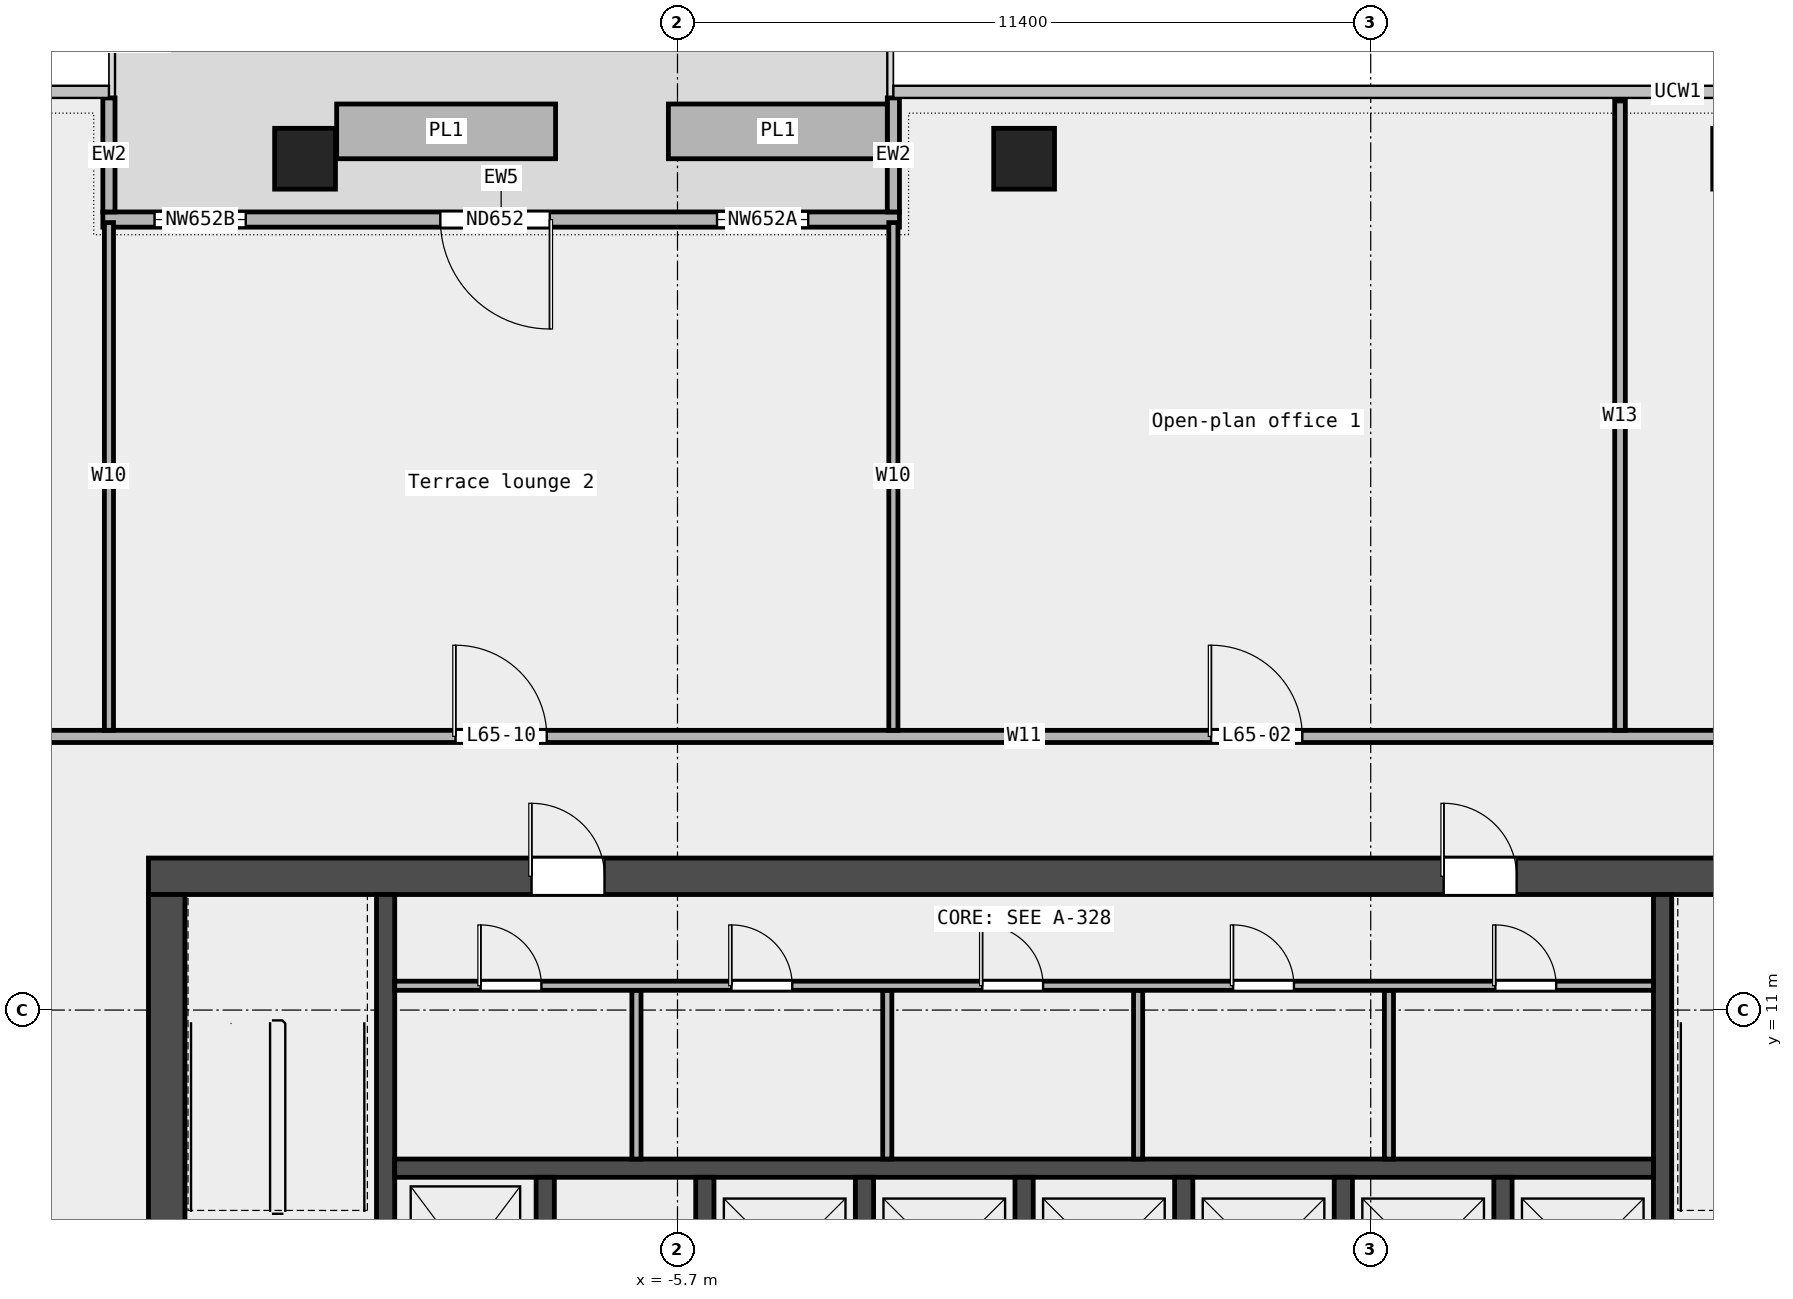
"""IFC4 building model, lengths in metres.
Left out: names, types, materials, properties, quantities, classifications, styles, units other than length and angle.
Written with IfcOpenShell. Run it as: python <this file> out.ifc"""

import sys

from ifc_helpers import new_model, si_unit, direction, frame, frame_2d, origin, origin_2d, place, context, subcontext, project, spatial, rectangle, extrude, element, fill, save


model = new_model("IFC4")
c1 = context("Model", 3, precision=1e-05, world=origin(), true_north=direction((0.0, 1.0)))
c2 = subcontext(c1, "Body", "Model", "MODEL_VIEW")
j1 = project(units=[si_unit("LENGTHUNIT", "METRE"), si_unit("PLANEANGLEUNIT", "RADIAN")], contexts=[c1])
p1 = place(None, origin())
s1 = spatial("IfcSite", under=j1, at=p1, CompositionType="ELEMENT")
p2 = place(p1, origin())
s2 = spatial("IfcBuilding", under=s1, at=p2, CompositionType="ELEMENT")
p3 = place(p2, frame((0.0, 0.0, 299.4)))
s3 = spatial("IfcBuildingStorey", under=s2, at=p3, CompositionType="ELEMENT", Elevation=299.4)
for number, where, z_axis, x_axis in (
    (1, (11.825, 25.0, 0.0), (0.0, 0.0, 1.0), (1.0, 0.0, 0.0)),
    (2, (0.0, 25.0, 0.0), (0.0, 0.0, 1.0), (1.0, 0.0, 0.0)),
    (3, (-11.825, 25.0, 0.0), (0.0, 0.0, 1.0), (1.0, 0.0, 0.0)),
):
    element("IfcColumn", number, at=place(p3, frame(where, z_axis=z_axis, x_axis=x_axis)), inside=s3, PredefinedType="COLUMN", context=c2, shape_type="SweptSolid", body=[
        extrude(rectangle(XDim=1.0, YDim=1.0, at=origin_2d()), origin(), (0.0, 0.0, 1.0), 3.6),
    ])
p4 = place(p3, frame((-2.05, 24.0, 0.0), z_axis=(0.0, 0.0, 1.0), x_axis=(-1.0, 0.0, 0.0)))
e4 = element("IfcWall", 4, at=p4, inside=s3, PredefinedType="STANDARD", context=c2, shape_type="SweptSolid", body=[
    extrude(rectangle(XDim=13.1, YDim=0.25, at=frame_2d((6.55, 0.0))), origin(), (0.0, 0.0, 1.0), 3.6),
])
p5 = place(p4, frame((1.5, 0.0, 0.45)))
e5 = element("IfcOpeningElement", 5, at=p5, cuts=e4, PredefinedType="OPENING", context=c2, shape_type="SweptSolid", body=[
    extrude(rectangle(XDim=1.5, YDim=2.4, at=frame_2d((0.75, 1.2))), frame((0.0, 0.137, 0.0), z_axis=(0.0, -1.0, 0.0), x_axis=(1.0, 0.0, 0.0)), (0.0, 0.0, 1.0), 0.274),
])
p6 = place(p4, frame((5.75, 0.0, 0.0)))
e6 = element("IfcOpeningElement", 6, at=p6, cuts=e4, PredefinedType="OPENING", context=c2, shape_type="SweptSolid", body=[
    extrude(rectangle(XDim=1.8, YDim=2.4, at=frame_2d((0.9, 1.2))), frame((0.0, 0.137, 0.0), z_axis=(0.0, -1.0, 0.0), x_axis=(1.0, 0.0, 0.0)), (0.0, 0.0, 1.0), 0.274),
])
p7 = place(p4, frame((10.75, 0.0, 0.45)))
e7 = element("IfcOpeningElement", 7, at=p7, cuts=e4, PredefinedType="OPENING", context=c2, shape_type="SweptSolid", body=[
    extrude(rectangle(XDim=1.5, YDim=2.4, at=frame_2d((0.75, 1.2))), frame((0.0, 0.137, 0.0), z_axis=(0.0, -1.0, 0.0), x_axis=(1.0, 0.0, 0.0)), (0.0, 0.0, 1.0), 0.274),
])
for number, where, z_axis, x_axis in (
    (8, (-2.15, 26.0, 0.0), (0.0, 0.0, 1.0), (0.0, -1.0, 0.0)),
    (9, (-15.05, 26.0, 0.0), (0.0, 0.0, 1.0), (0.0, -1.0, 0.0)),
):
    element("IfcWall", number, at=place(p3, frame(where, z_axis=z_axis, x_axis=x_axis)), inside=s3, PredefinedType="STANDARD", context=c2, shape_type="SweptSolid", body=[
        extrude(rectangle(XDim=1.875, YDim=0.2, at=frame_2d((0.938, 0.0))), origin(), (0.0, 0.0, 1.0), 3.6),
    ])
for number, where, z_axis, x_axis in (
    (10, (-2.25, 25.45, 0.0), (0.0, 0.0, 1.0), (-1.0, 0.0, 0.0)),
    (11, (-7.705, 25.45, 0.0), (0.0, 0.0, 1.0), (-1.0, 0.0, 0.0)),
):
    element("IfcWall", number, at=place(p3, frame(where, z_axis=z_axis, x_axis=x_axis)), inside=s3, PredefinedType="STANDARD", context=c2, shape_type="SweptSolid", body=[
        extrude(rectangle(XDim=3.6, YDim=0.9, at=frame_2d((1.8, 0.0))), origin(), (0.0, 0.0, 1.0), 0.7),
    ])
p8 = place(p3, frame((-29.6, 15.5, 0.0), z_axis=(0.0, 0.0, 1.0), x_axis=(1.0, 0.0, 0.0)))
e12 = element("IfcWall", 12, at=p8, inside=s3, PredefinedType="PARTITIONING", context=c2, shape_type="SweptSolid", body=[
    extrude(rectangle(XDim=59.2, YDim=0.2, at=frame_2d((29.6, 0.0))), origin(), (0.0, 0.0, 1.0), 3.6),
])
p9 = place(p8, frame((48.3, 0.0, 0.0)))
e13 = element("IfcOpeningElement", 13, at=p9, cuts=e12, PredefinedType="OPENING", context=c2, shape_type="SweptSolid", body=[
    extrude(rectangle(XDim=1.8, YDim=2.1, at=frame_2d((0.9, 1.05))), frame((0.0, 0.112, 0.0), z_axis=(0.0, -1.0, 0.0), x_axis=(1.0, 0.0, 0.0)), (0.0, 0.0, 1.0), 0.224),
])
p10 = place(p8, frame((32.675, 0.0, 0.0)))
e14 = element("IfcOpeningElement", 14, at=p10, cuts=e12, PredefinedType="OPENING", context=c2, shape_type="SweptSolid", body=[
    extrude(rectangle(XDim=1.5, YDim=2.1, at=frame_2d((0.75, 1.05))), frame((0.0, 0.112, 0.0), z_axis=(0.0, -1.0, 0.0), x_axis=(1.0, 0.0, 0.0)), (0.0, 0.0, 1.0), 0.224),
])
p11 = place(p8, frame((6.625, 0.0, 0.0)))
e15 = element("IfcOpeningElement", 15, at=p11, cuts=e12, PredefinedType="OPENING", context=c2, shape_type="SweptSolid", body=[
    extrude(rectangle(XDim=1.5, YDim=2.1, at=frame_2d((0.75, 1.05))), frame((0.0, 0.112, 0.0), z_axis=(0.0, -1.0, 0.0), x_axis=(1.0, 0.0, 0.0)), (0.0, 0.0, 1.0), 0.224),
])
p12 = place(p8, frame((20.25, 0.0, 0.0)))
e16 = element("IfcOpeningElement", 16, at=p12, cuts=e12, PredefinedType="OPENING", context=c2, shape_type="SweptSolid", body=[
    extrude(rectangle(XDim=1.5, YDim=2.1, at=frame_2d((0.75, 1.05))), frame((0.0, 0.112, 0.0), z_axis=(0.0, -1.0, 0.0), x_axis=(1.0, 0.0, 0.0)), (0.0, 0.0, 1.0), 0.224),
])
for number, where, z_axis, x_axis in (
    (17, (-15.05, 15.6, 0.0), (0.0, 0.0, 1.0), (0.0, 1.0, 0.0)),
    (18, (-2.15, 15.6, 0.0), (0.0, 0.0, 1.0), (0.0, 1.0, 0.0)),
):
    element("IfcWall", number, at=place(p3, frame(where, z_axis=z_axis, x_axis=x_axis)), inside=s3, PredefinedType="PARTITIONING", context=c2, shape_type="SweptSolid", body=[
        extrude(rectangle(XDim=8.35, YDim=0.15, at=frame_2d((4.175, 0.0))), origin(), (0.0, 0.0, 1.0), 3.6),
    ])
p13 = place(p3, frame((9.8, 15.6, 0.0), z_axis=(0.0, 0.0, 1.0), x_axis=(0.0, 1.0, 0.0)))
e19 = element("IfcWall", 19, at=p13, inside=s3, PredefinedType="PARTITIONING", context=c2, shape_type="SweptSolid", body=[
    extrude(rectangle(XDim=10.35, YDim=0.175, at=frame_2d((5.175, 0.0))), origin(), (0.0, 0.0, 1.0), 3.6),
])
p14 = place(p3, frame((-14.4, 13.2, 0.0), z_axis=(0.0, 0.0, 1.0), x_axis=(1.0, 0.0, 0.0)))
e20 = element("IfcWall", 20, at=p14, inside=s3, PredefinedType="SHEAR", context=c2, shape_type="SweptSolid", body=[
    extrude(rectangle(XDim=28.8, YDim=0.6, at=frame_2d((14.4, 0.0))), origin(), (0.0, 0.0, 1.0), 3.7),
])
p15 = place(p14, frame((6.3, 0.0, 0.0)))
e21 = element("IfcOpeningElement", 21, at=p15, cuts=e20, PredefinedType="OPENING", context=c2, shape_type="SweptSolid", body=[
    extrude(rectangle(XDim=1.2, YDim=2.1, at=frame_2d((0.6, 1.05))), frame((0.0, 0.312, 0.0), z_axis=(0.0, -1.0, 0.0), x_axis=(1.0, 0.0, 0.0)), (0.0, 0.0, 1.0), 0.624),
])
p16 = place(p14, frame((21.3, 0.0, 0.0)))
e22 = element("IfcOpeningElement", 22, at=p16, cuts=e20, PredefinedType="OPENING", context=c2, shape_type="SweptSolid", body=[
    extrude(rectangle(XDim=1.2, YDim=2.1, at=frame_2d((0.6, 1.05))), frame((0.0, 0.312, 0.0), z_axis=(0.0, -1.0, 0.0), x_axis=(1.0, 0.0, 0.0)), (0.0, 0.0, 1.0), 0.624),
])
p17 = place(p3, frame((-14.1, -6.6, 0.0), z_axis=(0.0, 0.0, 1.0), x_axis=(0.0, 1.0, 0.0)))
e23 = element("IfcWall", 23, at=p17, inside=s3, PredefinedType="SHEAR", context=c2, shape_type="SweptSolid", body=[
    extrude(rectangle(XDim=19.5, YDim=0.6, at=frame_2d((9.75, 0.0))), origin(), (0.0, 0.0, 1.0), 3.7),
])
p18 = place(p17, frame((9.3, 0.0, 0.0)))
e24 = element("IfcOpeningElement", 24, at=p18, cuts=e23, PredefinedType="OPENING", context=c2, shape_type="SweptSolid", body=[
    extrude(rectangle(XDim=1.8, YDim=2.1, at=frame_2d((0.9, 1.05))), frame((0.0, 0.312, 0.0), z_axis=(0.0, -1.0, 0.0), x_axis=(1.0, 0.0, 0.0)), (0.0, 0.0, 1.0), 0.624),
])
for number, where, z_axis, x_axis in (
    (25, (-10.5, 5.25, 0.0), (0.0, 0.0, 1.0), (0.0, 1.0, 0.0)),
    (26, (10.5, 5.25, 0.0), (0.0, 0.0, 1.0), (0.0, 1.0, 0.0)),
):
    element("IfcWall", number, at=place(p3, frame(where, z_axis=z_axis, x_axis=x_axis)), inside=s3, PredefinedType="SHEAR", context=c2, shape_type="SweptSolid", body=[
        extrude(rectangle(XDim=7.65, YDim=0.3, at=frame_2d((3.825, 0.0))), origin(), (0.0, 0.0, 1.0), 3.7),
    ])
p19 = place(p3, frame((-10.35, 8.4, 0.0), z_axis=(0.0, 0.0, 1.0), x_axis=(1.0, 0.0, 0.0)))
e27 = element("IfcWall", 27, at=p19, inside=s3, PredefinedType="SOLIDWALL", context=c2, shape_type="SweptSolid", body=[
    extrude(rectangle(XDim=20.7, YDim=0.3, at=frame_2d((10.35, 0.0))), origin(), (0.0, 0.0, 1.0), 3.7),
])
for number, where, z_axis, x_axis in (
    (28, (-7.875, 5.55, 0.0), (0.0, 0.0, 1.0), (0.0, 1.0, 0.0)),
    (29, (-5.25, 5.55, 0.0), (0.0, 0.0, 1.0), (0.0, 1.0, 0.0)),
    (30, (-2.625, 5.55, 0.0), (0.0, 0.0, 1.0), (0.0, 1.0, 0.0)),
    (31, (0.0, 5.55, 0.0), (0.0, 0.0, 1.0), (0.0, 1.0, 0.0)),
    (32, (2.625, 5.55, 0.0), (0.0, 0.0, 1.0), (0.0, 1.0, 0.0)),
    (33, (5.25, 5.55, 0.0), (0.0, 0.0, 1.0), (0.0, 1.0, 0.0)),
    (34, (7.875, 5.55, 0.0), (0.0, 0.0, 1.0), (0.0, 1.0, 0.0)),
):
    element("IfcWall", number, at=place(p3, frame(where, z_axis=z_axis, x_axis=x_axis)), inside=s3, PredefinedType="SOLIDWALL", context=c2, shape_type="SweptSolid", body=[
        extrude(rectangle(XDim=2.7, YDim=0.3, at=frame_2d((1.35, 0.0))), origin(), (0.0, 0.0, 1.0), 3.7),
    ])
for number, where, z_axis, x_axis in (
    (35, (-6.375, 8.55, 0.0), (0.0, 0.0, 1.0), (0.0, 1.0, 0.0)),
    (36, (-2.25, 8.55, 0.0), (0.0, 0.0, 1.0), (0.0, 1.0, 0.0)),
    (37, (1.875, 8.55, 0.0), (0.0, 0.0, 1.0), (0.0, 1.0, 0.0)),
    (38, (6.0, 8.55, 0.0), (0.0, 0.0, 1.0), (0.0, 1.0, 0.0)),
):
    element("IfcWall", number, at=place(p3, frame(where, z_axis=z_axis, x_axis=x_axis)), inside=s3, PredefinedType="PARTITIONING", context=c2, shape_type="SweptSolid", body=[
        extrude(rectangle(XDim=2.775, YDim=0.15, at=frame_2d((1.387, 0.0))), origin(), (0.0, 0.0, 1.0), 3.7),
    ])
p20 = place(p3, frame((-10.35, 11.4, 0.0), z_axis=(0.0, 0.0, 1.0), x_axis=(1.0, 0.0, 0.0)))
e39 = element("IfcWall", 39, at=p20, inside=s3, PredefinedType="PARTITIONING", context=c2, shape_type="SweptSolid", body=[
    extrude(rectangle(XDim=20.7, YDim=0.15, at=frame_2d((10.35, 0.0))), origin(), (0.0, 0.0, 1.0), 3.7),
])
p21 = place(p20, frame((1.413, 0.0, 0.0)))
e40 = element("IfcOpeningElement", 40, at=p21, cuts=e39, PredefinedType="OPENING", context=c2, shape_type="SweptSolid", body=[
    extrude(rectangle(XDim=1.0, YDim=2.1, at=frame_2d((0.5, 1.05))), frame((0.0, 0.087, 0.0), z_axis=(0.0, -1.0, 0.0), x_axis=(1.0, 0.0, 0.0)), (0.0, 0.0, 1.0), 0.174),
])
p22 = place(p20, frame((5.538, 0.0, 0.0)))
e41 = element("IfcOpeningElement", 41, at=p22, cuts=e39, PredefinedType="OPENING", context=c2, shape_type="SweptSolid", body=[
    extrude(rectangle(XDim=1.0, YDim=2.1, at=frame_2d((0.5, 1.05))), frame((0.0, 0.087, 0.0), z_axis=(0.0, -1.0, 0.0), x_axis=(1.0, 0.0, 0.0)), (0.0, 0.0, 1.0), 0.174),
])
p23 = place(p20, frame((9.663, 0.0, 0.0)))
e42 = element("IfcOpeningElement", 42, at=p23, cuts=e39, PredefinedType="OPENING", context=c2, shape_type="SweptSolid", body=[
    extrude(rectangle(XDim=1.0, YDim=2.1, at=frame_2d((0.5, 1.05))), frame((0.0, 0.087, 0.0), z_axis=(0.0, -1.0, 0.0), x_axis=(1.0, 0.0, 0.0)), (0.0, 0.0, 1.0), 0.174),
])
p24 = place(p20, frame((13.788, 0.0, 0.0)))
e43 = element("IfcOpeningElement", 43, at=p24, cuts=e39, PredefinedType="OPENING", context=c2, shape_type="SweptSolid", body=[
    extrude(rectangle(XDim=1.0, YDim=2.1, at=frame_2d((0.5, 1.05))), frame((0.0, 0.087, 0.0), z_axis=(0.0, -1.0, 0.0), x_axis=(1.0, 0.0, 0.0)), (0.0, 0.0, 1.0), 0.174),
])
p25 = place(p20, frame((18.1, 0.0, 0.0)))
e44 = element("IfcOpeningElement", 44, at=p25, cuts=e39, PredefinedType="OPENING", context=c2, shape_type="SweptSolid", body=[
    extrude(rectangle(XDim=1.0, YDim=2.1, at=frame_2d((0.5, 1.05))), frame((0.0, 0.087, 0.0), z_axis=(0.0, -1.0, 0.0), x_axis=(1.0, 0.0, 0.0)), (0.0, 0.0, 1.0), 0.174),
])
p26 = place(p5, origin())
e45 = element("IfcWindow", 45, at=p26, inside=s3, PartitioningType="SINGLE_PANEL", PredefinedType="WINDOW", context=c2, shape_type="SweptSolid", body=[
    extrude(rectangle(XDim=1.5, YDim=2.4, at=frame_2d((0.75, 1.2))), frame((0.0, 0.03, 0.0), z_axis=(0.0, -1.0, 0.0), x_axis=(1.0, 0.0, 0.0)), (0.0, 0.0, 1.0), 0.06),
])
fill(e5, e45)
p27 = place(p6, origin())
e46 = element("IfcDoor", 46, at=p27, inside=s3, OperationType="DOUBLE_DOOR_SINGLE_SWING", PredefinedType="DOOR", context=c2, shape_type="SweptSolid", body=[
    extrude(rectangle(XDim=1.8, YDim=2.4, at=frame_2d((0.9, 1.2))), frame((0.0, 0.025, 0.0), z_axis=(0.0, -1.0, 0.0), x_axis=(1.0, 0.0, 0.0)), (0.0, 0.0, 1.0), 0.05),
])
fill(e6, e46)
p28 = place(p7, origin())
e47 = element("IfcWindow", 47, at=p28, inside=s3, PartitioningType="SINGLE_PANEL", PredefinedType="WINDOW", context=c2, shape_type="SweptSolid", body=[
    extrude(rectangle(XDim=1.5, YDim=2.4, at=frame_2d((0.75, 1.2))), frame((0.0, 0.03, 0.0), z_axis=(0.0, -1.0, 0.0), x_axis=(1.0, 0.0, 0.0)), (0.0, 0.0, 1.0), 0.06),
])
fill(e7, e47)
p29 = place(p10, origin())
e48 = element("IfcDoor", 48, at=p29, inside=s3, OperationType="DOUBLE_DOOR_SINGLE_SWING", PredefinedType="DOOR", context=c2, shape_type="SweptSolid", body=[
    extrude(rectangle(XDim=1.5, YDim=2.1, at=frame_2d((0.75, 1.05))), frame((0.0, 0.025, 0.0), z_axis=(0.0, -1.0, 0.0), x_axis=(1.0, 0.0, 0.0)), (0.0, 0.0, 1.0), 0.05),
])
fill(e14, e48)
p30 = place(p12, origin())
e49 = element("IfcDoor", 49, at=p30, inside=s3, OperationType="DOUBLE_DOOR_SINGLE_SWING", PredefinedType="DOOR", context=c2, shape_type="SweptSolid", body=[
    extrude(rectangle(XDim=1.5, YDim=2.1, at=frame_2d((0.75, 1.05))), frame((0.0, 0.025, 0.0), z_axis=(0.0, -1.0, 0.0), x_axis=(1.0, 0.0, 0.0)), (0.0, 0.0, 1.0), 0.05),
])
fill(e16, e49)
p31 = place(p21, origin())
e50 = element("IfcDoor", 50, at=p31, inside=s3, OperationType="SINGLE_SWING_LEFT", PredefinedType="DOOR", context=c2, shape_type="SweptSolid", body=[
    extrude(rectangle(XDim=1.0, YDim=2.1, at=frame_2d((0.5, 1.05))), frame((0.0, 0.025, 0.0), z_axis=(0.0, -1.0, 0.0), x_axis=(1.0, 0.0, 0.0)), (0.0, 0.0, 1.0), 0.05),
])
fill(e40, e50)
p32 = place(p22, origin())
e51 = element("IfcDoor", 51, at=p32, inside=s3, OperationType="SINGLE_SWING_LEFT", PredefinedType="DOOR", context=c2, shape_type="SweptSolid", body=[
    extrude(rectangle(XDim=1.0, YDim=2.1, at=frame_2d((0.5, 1.05))), frame((0.0, 0.025, 0.0), z_axis=(0.0, -1.0, 0.0), x_axis=(1.0, 0.0, 0.0)), (0.0, 0.0, 1.0), 0.05),
])
fill(e41, e51)
p33 = place(p23, origin())
e52 = element("IfcDoor", 52, at=p33, inside=s3, OperationType="SINGLE_SWING_LEFT", PredefinedType="DOOR", context=c2, shape_type="SweptSolid", body=[
    extrude(rectangle(XDim=1.0, YDim=2.1, at=frame_2d((0.5, 1.05))), frame((0.0, 0.025, 0.0), z_axis=(0.0, -1.0, 0.0), x_axis=(1.0, 0.0, 0.0)), (0.0, 0.0, 1.0), 0.05),
])
fill(e42, e52)
p34 = place(p24, origin())
e53 = element("IfcDoor", 53, at=p34, inside=s3, OperationType="SINGLE_SWING_LEFT", PredefinedType="DOOR", context=c2, shape_type="SweptSolid", body=[
    extrude(rectangle(XDim=1.0, YDim=2.1, at=frame_2d((0.5, 1.05))), frame((0.0, 0.025, 0.0), z_axis=(0.0, -1.0, 0.0), x_axis=(1.0, 0.0, 0.0)), (0.0, 0.0, 1.0), 0.05),
])
fill(e43, e53)
p35 = place(p25, origin())
e54 = element("IfcDoor", 54, at=p35, inside=s3, OperationType="SINGLE_SWING_LEFT", PredefinedType="DOOR", context=c2, shape_type="SweptSolid", body=[
    extrude(rectangle(XDim=1.0, YDim=2.1, at=frame_2d((0.5, 1.05))), frame((0.0, 0.025, 0.0), z_axis=(0.0, -1.0, 0.0), x_axis=(1.0, 0.0, 0.0)), (0.0, 0.0, 1.0), 0.05),
])
fill(e44, e54)
p36 = place(p15, origin())
e55 = element("IfcDoor", 55, at=p36, inside=s3, OperationType="SINGLE_SWING_LEFT", PredefinedType="DOOR", context=c2, shape_type="SweptSolid", body=[
    extrude(rectangle(XDim=1.2, YDim=2.1, at=frame_2d((0.6, 1.05))), frame((0.0, 0.025, 0.0), z_axis=(0.0, -1.0, 0.0), x_axis=(1.0, 0.0, 0.0)), (0.0, 0.0, 1.0), 0.05),
])
fill(e21, e55)
p37 = place(p16, origin())
e56 = element("IfcDoor", 56, at=p37, inside=s3, OperationType="SINGLE_SWING_RIGHT", PredefinedType="DOOR", context=c2, shape_type="SweptSolid", body=[
    extrude(rectangle(XDim=1.2, YDim=2.1, at=frame_2d((0.6, 1.05))), frame((0.0, 0.025, 0.0), z_axis=(0.0, -1.0, 0.0), x_axis=(1.0, 0.0, 0.0)), (0.0, 0.0, 1.0), 0.05),
])
fill(e22, e56)
save(model, sys.argv[1])
